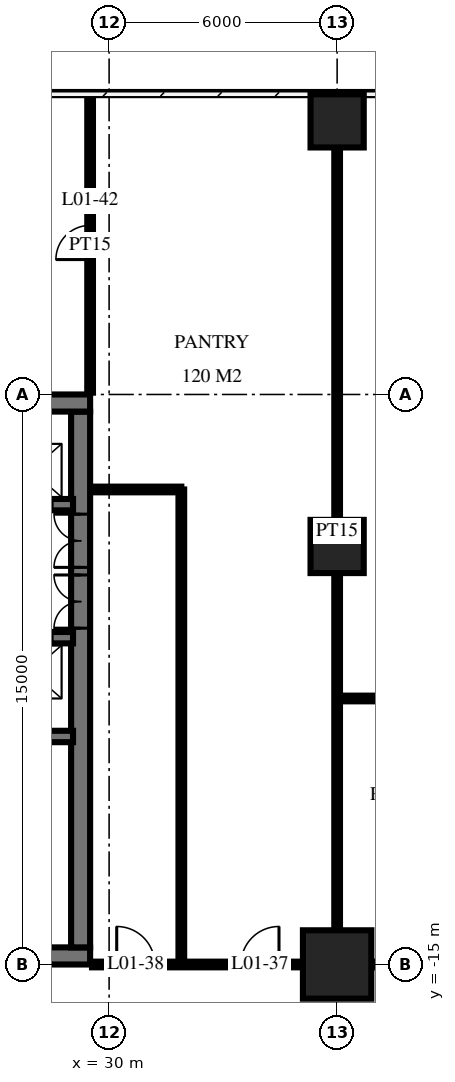
"""IFC4 building model, lengths in metres.
Left out: names, types, materials, properties, quantities, classifications, styles, units other than length and angle.
Written with IfcOpenShell. Run it as: python <this file> out.ifc"""

import sys

from ifc_helpers import new_model, si_unit, direction, frame, frame_2d, origin, origin_2d, place, context, subcontext, project, spatial, rectangle, circle, extrude, element, fill, save


model = new_model("IFC4")
c1 = context("Model", 3, precision=1e-05, world=origin(), true_north=direction((0.0, 1.0)))
c2 = subcontext(c1, "Body", "Model", "MODEL_VIEW")
j1 = project(units=[si_unit("LENGTHUNIT", "METRE"), si_unit("PLANEANGLEUNIT", "RADIAN")], contexts=[c1])
p1 = place(None, origin())
s1 = spatial("IfcSite", under=j1, at=p1, CompositionType="ELEMENT")
p2 = place(p1, origin())
s2 = spatial("IfcBuilding", under=s1, at=p2, CompositionType="ELEMENT")
p3 = place(p2, frame((0.0, 0.0, 7.0)))
s3 = spatial("IfcBuildingStorey", under=s2, at=p3, CompositionType="ELEMENT", Elevation=7.0)
p4 = place(p3, frame((36.0, -15.0, 0.0), z_axis=(0.0, 0.0, 1.0), x_axis=(1.0, 0.0, 0.0)))
e1 = element("IfcColumn", 1, at=p4, inside=s3, PredefinedType="COLUMN", context=c2, shape_type="SweptSolid", body=[
    extrude(circle(Radius=0.9, at=origin_2d()), origin(), (0.0, 0.0, 1.0), 5.5),
])
for number, where, z_axis, x_axis in (
    (2, (36.0, -4.0, 0.0), (0.0, 0.0, 1.0), (1.0, 0.0, 0.0)),
    (3, (36.0, 7.2, 0.0), (0.0, 0.0, 1.0), (1.0, 0.0, 0.0)),
):
    element("IfcColumn", number, at=place(p3, frame(where, z_axis=z_axis, x_axis=x_axis)), inside=s3, PredefinedType="COLUMN", context=c2, shape_type="SweptSolid", body=[
        extrude(circle(Radius=0.7, at=origin_2d()), origin(), (0.0, 0.0, 1.0), 5.5),
    ])
p5 = place(p3, frame((10.0, -0.225, 0.0), z_axis=(0.0, 0.0, 1.0), x_axis=(1.0, 0.0, 0.0)))
e4 = element("IfcWall", 4, at=p5, inside=s3, PredefinedType="SHEAR", context=c2, shape_type="SweptSolid", body=[
    extrude(rectangle(XDim=19.5, YDim=0.45, at=frame_2d((9.75, 0.0))), origin(), (0.0, 0.0, 1.0), 5.5),
])
p6 = place(p3, frame((10.0, -14.775, 0.0), z_axis=(0.0, 0.0, 1.0), x_axis=(1.0, 0.0, 0.0)))
e5 = element("IfcWall", 5, at=p6, inside=s3, PredefinedType="SHEAR", context=c2, shape_type="SweptSolid", body=[
    extrude(rectangle(XDim=19.5, YDim=0.45, at=frame_2d((9.75, 0.0))), origin(), (0.0, 0.0, 1.0), 5.5),
])
p7 = place(p6, frame((7.1, 0.0, 0.0)))
e6 = element("IfcOpeningElement", 6, at=p7, cuts=e5, PredefinedType="OPENING", context=c2, shape_type="SweptSolid", body=[
    extrude(rectangle(XDim=1.2, YDim=2.1, at=frame_2d((0.6, 1.05))), frame((0.0, 0.235, 0.0), z_axis=(0.0, -1.0, 0.0), x_axis=(1.0, 0.0, 0.0)), (0.0, 0.0, 1.0), 0.47),
])
p8 = place(p6, frame((4.15, 0.0, 0.0)))
e7 = element("IfcOpeningElement", 7, at=p8, cuts=e5, PredefinedType="OPENING", context=c2, shape_type="SweptSolid", body=[
    extrude(rectangle(XDim=1.1, YDim=2.1, at=frame_2d((0.55, 1.05))), frame((0.0, 0.235, 0.0), z_axis=(0.0, -1.0, 0.0), x_axis=(1.0, 0.0, 0.0)), (0.0, 0.0, 1.0), 0.47),
])
p9 = place(p6, frame((10.1, 0.0, 0.0)))
e8 = element("IfcOpeningElement", 8, at=p9, cuts=e5, PredefinedType="OPENING", context=c2, shape_type="SweptSolid", body=[
    extrude(rectangle(XDim=0.9, YDim=2.1, at=frame_2d((0.45, 1.05))), frame((0.0, 0.235, 0.0), z_axis=(0.0, -1.0, 0.0), x_axis=(1.0, 0.0, 0.0)), (0.0, 0.0, 1.0), 0.47),
])
p10 = place(p6, frame((12.45, 0.0, 0.0)))
e9 = element("IfcOpeningElement", 9, at=p10, cuts=e5, PredefinedType="OPENING", context=c2, shape_type="SweptSolid", body=[
    extrude(rectangle(XDim=1.0, YDim=2.1, at=frame_2d((0.5, 1.05))), frame((0.0, 0.235, 0.0), z_axis=(0.0, -1.0, 0.0), x_axis=(1.0, 0.0, 0.0)), (0.0, 0.0, 1.0), 0.47),
])
p11 = place(p6, frame((15.087, 0.0, 0.0)))
e10 = element("IfcOpeningElement", 10, at=p11, cuts=e5, PredefinedType="OPENING", context=c2, shape_type="SweptSolid", body=[
    extrude(rectangle(XDim=1.0, YDim=2.1, at=frame_2d((0.5, 1.05))), frame((0.0, 0.235, 0.0), z_axis=(0.0, -1.0, 0.0), x_axis=(1.0, 0.0, 0.0)), (0.0, 0.0, 1.0), 0.47),
])
p12 = place(p6, frame((17.413, 0.0, 0.0)))
e11 = element("IfcOpeningElement", 11, at=p12, cuts=e5, PredefinedType="OPENING", context=c2, shape_type="SweptSolid", body=[
    extrude(rectangle(XDim=1.0, YDim=2.1, at=frame_2d((0.5, 1.05))), frame((0.0, 0.235, 0.0), z_axis=(0.0, -1.0, 0.0), x_axis=(1.0, 0.0, 0.0)), (0.0, 0.0, 1.0), 0.47),
])
p13 = place(p3, frame((29.25, -14.55, 0.0), z_axis=(0.0, 0.0, 1.0), x_axis=(0.0, 1.0, 0.0)))
e12 = element("IfcWall", 12, at=p13, inside=s3, PredefinedType="SHEAR", context=c2, shape_type="SweptSolid", body=[
    extrude(rectangle(XDim=14.1, YDim=0.5, at=frame_2d((7.05, 0.0))), origin(), (0.0, 0.0, 1.0), 5.5),
])
p14 = place(p13, frame((8.4, 0.0, 0.0)))
e13 = element("IfcOpeningElement", 13, at=p14, cuts=e12, PredefinedType="OPENING", context=c2, shape_type="SweptSolid", body=[
    extrude(rectangle(XDim=1.4, YDim=2.4, at=frame_2d((0.7, 1.2))), frame((0.0, 0.26, 0.0), z_axis=(0.0, -1.0, 0.0), x_axis=(1.0, 0.0, 0.0)), (0.0, 0.0, 1.0), 0.52),
])
p15 = place(p13, frame((10.0, 0.0, 0.0)))
e14 = element("IfcOpeningElement", 14, at=p15, cuts=e12, PredefinedType="OPENING", context=c2, shape_type="SweptSolid", body=[
    extrude(rectangle(XDim=1.4, YDim=2.4, at=frame_2d((0.7, 1.2))), frame((0.0, 0.26, 0.0), z_axis=(0.0, -1.0, 0.0), x_axis=(1.0, 0.0, 0.0)), (0.0, 0.0, 1.0), 0.52),
])
p16 = place(p3, frame((10.35, -2.9, 0.0), z_axis=(0.0, 0.0, 1.0), x_axis=(1.0, 0.0, 0.0)))
e15 = element("IfcWall", 15, at=p16, inside=s3, PredefinedType="SHEAR", context=c2, shape_type="SweptSolid", body=[
    extrude(rectangle(XDim=18.7, YDim=0.3, at=frame_2d((9.35, 0.0))), origin(), (0.0, 0.0, 1.0), 5.5),
])
p17 = place(p16, frame((14.65, 0.0, 0.0)))
e16 = element("IfcOpeningElement", 16, at=p17, cuts=e15, PredefinedType="OPENING", context=c2, shape_type="SweptSolid", body=[
    extrude(rectangle(XDim=1.1, YDim=2.1, at=frame_2d((0.55, 1.05))), frame((0.0, 0.16, 0.0), z_axis=(0.0, -1.0, 0.0), x_axis=(1.0, 0.0, 0.0)), (0.0, 0.0, 1.0), 0.32),
])
p18 = place(p16, frame((17.05, 0.0, 0.0)))
e17 = element("IfcOpeningElement", 17, at=p18, cuts=e15, PredefinedType="OPENING", context=c2, shape_type="SweptSolid", body=[
    extrude(rectangle(XDim=1.1, YDim=2.1, at=frame_2d((0.55, 1.05))), frame((0.0, 0.16, 0.0), z_axis=(0.0, -1.0, 0.0), x_axis=(1.0, 0.0, 0.0)), (0.0, 0.0, 1.0), 0.32),
])
p19 = place(p16, frame((6.9, 0.0, 0.0)))
e18 = element("IfcOpeningElement", 18, at=p19, cuts=e15, PredefinedType="OPENING", context=c2, shape_type="SweptSolid", body=[
    extrude(rectangle(XDim=0.9, YDim=2.1, at=frame_2d((0.45, 1.05))), frame((0.0, 0.16, 0.0), z_axis=(0.0, -1.0, 0.0), x_axis=(1.0, 0.0, 0.0)), (0.0, 0.0, 1.0), 0.32),
])
p20 = place(p16, frame((0.85, 0.0, 0.0)))
e19 = element("IfcOpeningElement", 19, at=p20, cuts=e15, PredefinedType="OPENING", context=c2, shape_type="SweptSolid", body=[
    extrude(rectangle(XDim=1.0, YDim=2.1, at=frame_2d((0.5, 1.05))), frame((0.0, 0.16, 0.0), z_axis=(0.0, -1.0, 0.0), x_axis=(1.0, 0.0, 0.0)), (0.0, 0.0, 1.0), 0.32),
])
p21 = place(p16, frame((3.85, 0.0, 0.0)))
e20 = element("IfcOpeningElement", 20, at=p21, cuts=e15, PredefinedType="OPENING", context=c2, shape_type="SweptSolid", body=[
    extrude(rectangle(XDim=1.0, YDim=2.1, at=frame_2d((0.5, 1.05))), frame((0.0, 0.16, 0.0), z_axis=(0.0, -1.0, 0.0), x_axis=(1.0, 0.0, 0.0)), (0.0, 0.0, 1.0), 0.32),
])
p22 = place(p16, frame((12.1, 0.0, 0.0)))
e21 = element("IfcOpeningElement", 21, at=p22, cuts=e15, PredefinedType="OPENING", context=c2, shape_type="SweptSolid", body=[
    extrude(rectangle(XDim=1.0, YDim=2.1, at=frame_2d((0.5, 1.05))), frame((0.0, 0.16, 0.0), z_axis=(0.0, -1.0, 0.0), x_axis=(1.0, 0.0, 0.0)), (0.0, 0.0, 1.0), 0.32),
])
p23 = place(p3, frame((10.35, -6.4, 0.0), z_axis=(0.0, 0.0, 1.0), x_axis=(1.0, 0.0, 0.0)))
e22 = element("IfcWall", 22, at=p23, inside=s3, PredefinedType="SHEAR", context=c2, shape_type="SweptSolid", body=[
    extrude(rectangle(XDim=18.7, YDim=0.3, at=frame_2d((9.35, 0.0))), origin(), (0.0, 0.0, 1.0), 5.5),
])
p24 = place(p23, frame((14.65, 0.0, 0.0)))
e23 = element("IfcOpeningElement", 23, at=p24, cuts=e22, PredefinedType="OPENING", context=c2, shape_type="SweptSolid", body=[
    extrude(rectangle(XDim=1.1, YDim=2.1, at=frame_2d((0.55, 1.05))), frame((0.0, 0.16, 0.0), z_axis=(0.0, -1.0, 0.0), x_axis=(1.0, 0.0, 0.0)), (0.0, 0.0, 1.0), 0.32),
])
p25 = place(p23, frame((17.05, 0.0, 0.0)))
e24 = element("IfcOpeningElement", 24, at=p25, cuts=e22, PredefinedType="OPENING", context=c2, shape_type="SweptSolid", body=[
    extrude(rectangle(XDim=1.1, YDim=2.1, at=frame_2d((0.55, 1.05))), frame((0.0, 0.16, 0.0), z_axis=(0.0, -1.0, 0.0), x_axis=(1.0, 0.0, 0.0)), (0.0, 0.0, 1.0), 0.32),
])
p26 = place(p23, frame((6.8, 0.0, 0.0)))
e25 = element("IfcOpeningElement", 25, at=p26, cuts=e22, PredefinedType="OPENING", context=c2, shape_type="SweptSolid", body=[
    extrude(rectangle(XDim=1.1, YDim=2.1, at=frame_2d((0.55, 1.05))), frame((0.0, 0.16, 0.0), z_axis=(0.0, -1.0, 0.0), x_axis=(1.0, 0.0, 0.0)), (0.0, 0.0, 1.0), 0.32),
])
p27 = place(p23, frame((12.1, 0.0, 0.0)))
e26 = element("IfcOpeningElement", 26, at=p27, cuts=e22, PredefinedType="OPENING", context=c2, shape_type="SweptSolid", body=[
    extrude(rectangle(XDim=1.0, YDim=2.1, at=frame_2d((0.5, 1.05))), frame((0.0, 0.16, 0.0), z_axis=(0.0, -1.0, 0.0), x_axis=(1.0, 0.0, 0.0)), (0.0, 0.0, 1.0), 0.32),
])
p28 = place(p3, frame((10.35, -9.0, 0.0), z_axis=(0.0, 0.0, 1.0), x_axis=(1.0, 0.0, 0.0)))
e27 = element("IfcWall", 27, at=p28, inside=s3, PredefinedType="SHEAR", context=c2, shape_type="SweptSolid", body=[
    extrude(rectangle(XDim=18.7, YDim=0.3, at=frame_2d((9.35, 0.0))), origin(), (0.0, 0.0, 1.0), 5.5),
])
p29 = place(p28, frame((3.8, 0.0, 0.0)))
e28 = element("IfcOpeningElement", 28, at=p29, cuts=e27, PredefinedType="OPENING", context=c2, shape_type="SweptSolid", body=[
    extrude(rectangle(XDim=1.1, YDim=2.1, at=frame_2d((0.55, 1.05))), frame((0.0, 0.16, 0.0), z_axis=(0.0, -1.0, 0.0), x_axis=(1.0, 0.0, 0.0)), (0.0, 0.0, 1.0), 0.32),
])
p30 = place(p3, frame((36.0, -15.0, 0.0), z_axis=(0.0, 0.0, 1.0), x_axis=(0.0, 1.0, 0.0)))
e29 = element("IfcWall", 29, at=p30, inside=s3, PredefinedType="PARTITIONING", context=c2, shape_type="SweptSolid", body=[
    extrude(rectangle(XDim=22.82, YDim=0.15, at=frame_2d((11.41, 0.0))), origin(), (0.0, 0.0, 1.0), 5.05),
])
p31 = place(p3, frame((31.9, -15.0, 0.0), z_axis=(0.0, 0.0, 1.0), x_axis=(0.0, 1.0, 0.0)))
e30 = element("IfcWall", 30, at=p31, inside=s3, PredefinedType="PARTITIONING", context=c2, shape_type="SweptSolid", body=[
    extrude(rectangle(XDim=12.5, YDim=0.15, at=frame_2d((6.25, 0.0))), origin(), (0.0, 0.0, 1.0), 5.05),
])
p32 = place(p3, frame((29.5, 0.05, 0.0), z_axis=(0.0, 0.0, 1.0), x_axis=(0.0, 1.0, 0.0)))
e31 = element("IfcWall", 31, at=p32, inside=s3, PredefinedType="PARTITIONING", context=c2, shape_type="SweptSolid", body=[
    extrude(rectangle(XDim=7.77, YDim=0.15, at=frame_2d((3.885, 0.0))), origin(), (0.0, 0.0, 1.0), 5.05),
])
p33 = place(p32, frame((3.5, 0.0, 0.0)))
e32 = element("IfcOpeningElement", 32, at=p33, cuts=e31, PredefinedType="OPENING", context=c2, shape_type="SweptSolid", body=[
    extrude(rectangle(XDim=0.9, YDim=2.1, at=frame_2d((0.45, 1.05))), frame((0.0, 0.085, 0.0), z_axis=(0.0, -1.0, 0.0), x_axis=(1.0, 0.0, 0.0)), (0.0, 0.0, 1.0), 0.17),
])
p34 = place(p3, frame((29.55, -15.0, 0.0), z_axis=(0.0, 0.0, 1.0), x_axis=(1.0, 0.0, 0.0)))
e33 = element("IfcWall", 33, at=p34, inside=s3, PredefinedType="PARTITIONING", context=c2, shape_type="SweptSolid", body=[
    extrude(rectangle(XDim=18.27, YDim=0.15, at=frame_2d((9.135, 0.0))), origin(), (0.0, 0.0, 1.0), 5.05),
])
p35 = place(p34, frame((15.65, 0.0, 0.0)))
e34 = element("IfcOpeningElement", 34, at=p35, cuts=e33, PredefinedType="OPENING", context=c2, shape_type="SweptSolid", body=[
    extrude(rectangle(XDim=1.0, YDim=2.1, at=frame_2d((0.5, 1.05))), frame((0.0, 0.085, 0.0), z_axis=(0.0, -1.0, 0.0), x_axis=(1.0, 0.0, 0.0)), (0.0, 0.0, 1.0), 0.17),
])
p36 = place(p34, frame((13.47, 0.0, 0.0)))
e35 = element("IfcOpeningElement", 35, at=p36, cuts=e33, PredefinedType="OPENING", context=c2, shape_type="SweptSolid", body=[
    extrude(rectangle(XDim=1.0, YDim=2.1, at=frame_2d((0.5, 1.05))), frame((0.0, 0.085, 0.0), z_axis=(0.0, -1.0, 0.0), x_axis=(1.0, 0.0, 0.0)), (0.0, 0.0, 1.0), 0.17),
])
p37 = place(p34, frame((8.97, 0.0, 0.0)))
e36 = element("IfcOpeningElement", 36, at=p37, cuts=e33, PredefinedType="OPENING", context=c2, shape_type="SweptSolid", body=[
    extrude(rectangle(XDim=1.0, YDim=2.1, at=frame_2d((0.5, 1.05))), frame((0.0, 0.085, 0.0), z_axis=(0.0, -1.0, 0.0), x_axis=(1.0, 0.0, 0.0)), (0.0, 0.0, 1.0), 0.17),
])
p38 = place(p34, frame((3.92, 0.0, 0.0)))
e37 = element("IfcOpeningElement", 37, at=p38, cuts=e33, PredefinedType="OPENING", context=c2, shape_type="SweptSolid", body=[
    extrude(rectangle(XDim=1.0, YDim=2.1, at=frame_2d((0.5, 1.05))), frame((0.0, 0.085, 0.0), z_axis=(0.0, -1.0, 0.0), x_axis=(1.0, 0.0, 0.0)), (0.0, 0.0, 1.0), 0.17),
])
p39 = place(p34, frame((0.65, 0.0, 0.0)))
e38 = element("IfcOpeningElement", 38, at=p39, cuts=e33, PredefinedType="OPENING", context=c2, shape_type="SweptSolid", body=[
    extrude(rectangle(XDim=1.0, YDim=2.1, at=frame_2d((0.5, 1.05))), frame((0.0, 0.085, 0.0), z_axis=(0.0, -1.0, 0.0), x_axis=(1.0, 0.0, 0.0)), (0.0, 0.0, 1.0), 0.17),
])
p40 = place(p3, frame((36.0, -8.0, 0.0), z_axis=(0.0, 0.0, 1.0), x_axis=(1.0, 0.0, 0.0)))
e39 = element("IfcWall", 39, at=p40, inside=s3, PredefinedType="PARTITIONING", context=c2, shape_type="SweptSolid", body=[
    extrude(rectangle(XDim=6.0, YDim=0.15, at=frame_2d((3.0, 0.0))), origin(), (0.0, 0.0, 1.0), 5.05),
])
p41 = place(p40, frame((2.55, 0.0, 0.0)))
e40 = element("IfcOpeningElement", 40, at=p41, cuts=e39, PredefinedType="OPENING", context=c2, shape_type="SweptSolid", body=[
    extrude(rectangle(XDim=0.9, YDim=2.1, at=frame_2d((0.45, 1.05))), frame((0.0, 0.085, 0.0), z_axis=(0.0, -1.0, 0.0), x_axis=(1.0, 0.0, 0.0)), (0.0, 0.0, 1.0), 0.17),
])
p42 = place(p3, frame((29.55, -2.5, 0.0), z_axis=(0.0, 0.0, 1.0), x_axis=(1.0, 0.0, 0.0)))
e41 = element("IfcWall", 41, at=p42, inside=s3, PredefinedType="PARTITIONING", context=c2, shape_type="SweptSolid", body=[
    extrude(rectangle(XDim=2.35, YDim=0.15, at=frame_2d((1.175, 0.0))), origin(), (0.0, 0.0, 1.0), 5.05),
])
p43 = place(p18, origin())
e42 = element("IfcDoor", 42, at=p43, inside=s3, OperationType="DOUBLE_DOOR_SLIDING", PredefinedType="USERDEFINED", context=c2, shape_type="SweptSolid", body=[
    extrude(rectangle(XDim=1.1, YDim=2.1, at=frame_2d((0.55, 1.05))), frame((0.0, 0.025, 0.0), z_axis=(0.0, -1.0, 0.0), x_axis=(1.0, 0.0, 0.0)), (0.0, 0.0, 1.0), 0.05),
])
fill(e17, e42)
p44 = place(p25, origin())
e43 = element("IfcDoor", 43, at=p44, inside=s3, OperationType="DOUBLE_DOOR_SLIDING", PredefinedType="USERDEFINED", context=c2, shape_type="SweptSolid", body=[
    extrude(rectangle(XDim=1.1, YDim=2.1, at=frame_2d((0.55, 1.05))), frame((0.0, 0.025, 0.0), z_axis=(0.0, -1.0, 0.0), x_axis=(1.0, 0.0, 0.0)), (0.0, 0.0, 1.0), 0.05),
])
fill(e24, e43)
p45 = place(p14, origin())
e44 = element("IfcDoor", 44, at=p45, inside=s3, OperationType="DOUBLE_DOOR_SINGLE_SWING", PredefinedType="DOOR", context=c2, shape_type="SweptSolid", body=[
    extrude(rectangle(XDim=1.4, YDim=2.4, at=frame_2d((0.7, 1.2))), frame((0.0, 0.025, 0.0), z_axis=(0.0, -1.0, 0.0), x_axis=(1.0, 0.0, 0.0)), (0.0, 0.0, 1.0), 0.05),
])
fill(e13, e44)
p46 = place(p15, origin())
e45 = element("IfcDoor", 45, at=p46, inside=s3, OperationType="DOUBLE_DOOR_SINGLE_SWING", PredefinedType="DOOR", context=c2, shape_type="SweptSolid", body=[
    extrude(rectangle(XDim=1.4, YDim=2.4, at=frame_2d((0.7, 1.2))), frame((0.0, 0.025, 0.0), z_axis=(0.0, -1.0, 0.0), x_axis=(1.0, 0.0, 0.0)), (0.0, 0.0, 1.0), 0.05),
])
fill(e14, e45)
p47 = place(p38, origin())
e46 = element("IfcDoor", 46, at=p47, inside=s3, OperationType="SINGLE_SWING_LEFT", PredefinedType="DOOR", context=c2, shape_type="SweptSolid", body=[
    extrude(rectangle(XDim=1.0, YDim=2.1, at=frame_2d((0.5, 1.05))), frame((0.0, 0.025, 0.0), z_axis=(0.0, -1.0, 0.0), x_axis=(1.0, 0.0, 0.0)), (0.0, 0.0, 1.0), 0.05),
])
fill(e37, e46)
p48 = place(p39, origin())
e47 = element("IfcDoor", 47, at=p48, inside=s3, OperationType="SINGLE_SWING_RIGHT", PredefinedType="DOOR", context=c2, shape_type="SweptSolid", body=[
    extrude(rectangle(XDim=1.0, YDim=2.1, at=frame_2d((0.5, 1.05))), frame((0.0, 0.025, 0.0), z_axis=(0.0, -1.0, 0.0), x_axis=(1.0, 0.0, 0.0)), (0.0, 0.0, 1.0), 0.05),
])
fill(e38, e47)
p49 = place(p33, origin())
e48 = element("IfcDoor", 48, at=p49, inside=s3, OperationType="SINGLE_SWING_RIGHT", PredefinedType="DOOR", context=c2, shape_type="SweptSolid", body=[
    extrude(rectangle(XDim=0.9, YDim=2.1, at=frame_2d((0.45, 1.05))), frame((0.0, 0.025, 0.0), z_axis=(0.0, -1.0, 0.0), x_axis=(1.0, 0.0, 0.0)), (0.0, 0.0, 1.0), 0.05),
])
fill(e32, e48)
save(model, sys.argv[1])
